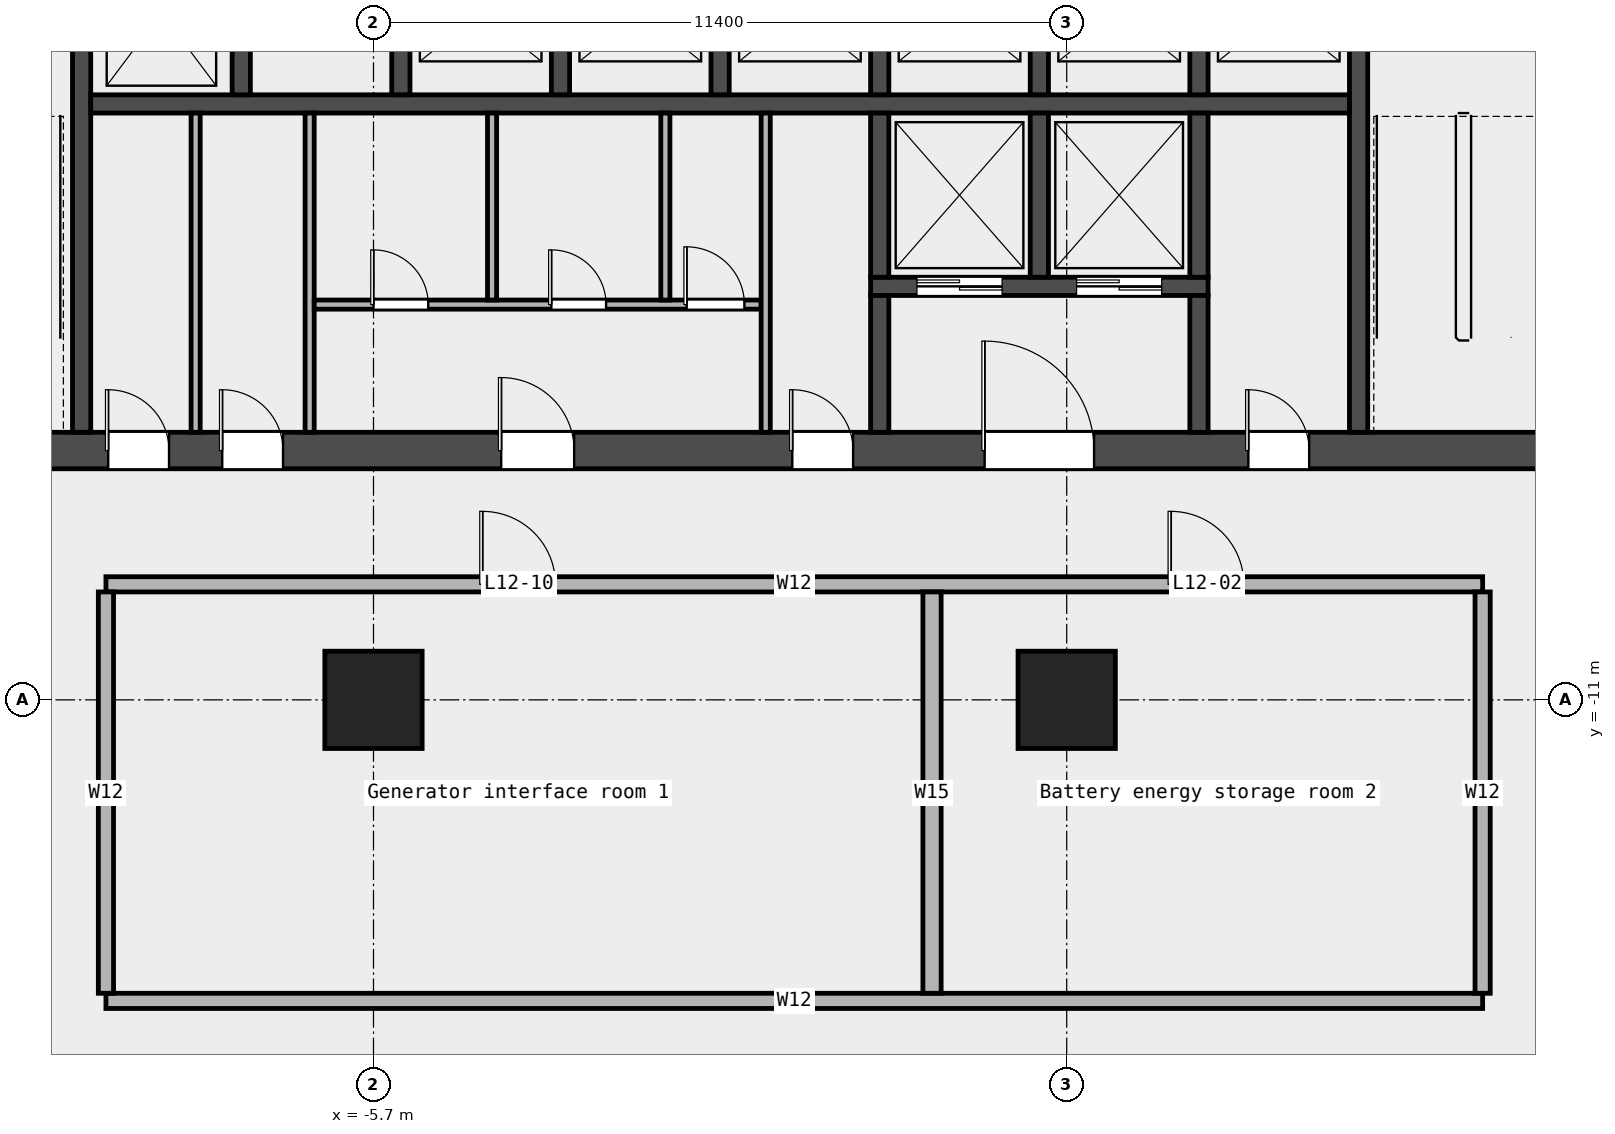
"""IFC4 building model, lengths in metres.
Left out: names, types, materials, properties, quantities, classifications, styles, units other than length and angle.
Written with IfcOpenShell. Run it as: python <this file> out.ifc"""

import sys

from ifc_helpers import new_model, si_unit, direction, frame, frame_2d, origin, origin_2d, place, context, subcontext, project, spatial, rectangle, extrude, element, fill, save


model = new_model("IFC4")
c1 = context("Model", 3, precision=1e-05, world=origin(), true_north=direction((0.0, 1.0)))
c2 = subcontext(c1, "Body", "Model", "MODEL_VIEW")
j1 = project(units=[si_unit("LENGTHUNIT", "METRE"), si_unit("PLANEANGLEUNIT", "RADIAN")], contexts=[c1])
p1 = place(None, origin())
s1 = spatial("IfcSite", under=j1, at=p1, CompositionType="ELEMENT")
p2 = place(p1, origin())
s2 = spatial("IfcBuilding", under=s1, at=p2, CompositionType="ELEMENT")
p3 = place(p2, frame((0.0, 0.0, 64.6)))
s3 = spatial("IfcBuildingStorey", under=s2, at=p3, CompositionType="ELEMENT", Elevation=64.6)
for number, where, z_axis, x_axis in (
    (1, (-5.7, -11.0, 0.0), (0.0, 0.0, 1.0), (1.0, 0.0, 0.0)),
    (2, (5.7, -11.0, 0.0), (0.0, 0.0, 1.0), (1.0, 0.0, 0.0)),
):
    element("IfcColumn", number, at=place(p3, frame(where, z_axis=z_axis, x_axis=x_axis)), inside=s3, PredefinedType="COLUMN", context=c2, shape_type="SweptSolid", body=[
        extrude(rectangle(XDim=1.6, YDim=1.6, at=origin_2d()), origin(), (0.0, 0.0, 1.0), 4.35),
    ])
p4 = place(p3, frame((-10.1, -15.95, 0.0), z_axis=(0.0, 0.0, 1.0), x_axis=(1.0, 0.0, 0.0)))
e3 = element("IfcWall", 3, at=p4, inside=s3, PredefinedType="PARTITIONING", context=c2, shape_type="SweptSolid", body=[
    extrude(rectangle(XDim=22.64, YDim=0.25, at=frame_2d((11.32, 0.0))), origin(), (0.0, 0.0, 1.0), 4.35),
])
p5 = place(p3, frame((-10.1, -9.1, 0.0), z_axis=(0.0, 0.0, 1.0), x_axis=(1.0, 0.0, 0.0)))
e4 = element("IfcWall", 4, at=p5, inside=s3, PredefinedType="PARTITIONING", context=c2, shape_type="SweptSolid", body=[
    extrude(rectangle(XDim=22.64, YDim=0.25, at=frame_2d((11.32, 0.0))), origin(), (0.0, 0.0, 1.0), 4.35),
])
p6 = place(p5, frame((17.512, 0.0, 0.0)))
e5 = element("IfcOpeningElement", 5, at=p6, cuts=e4, PredefinedType="OPENING", context=c2, shape_type="SweptSolid", body=[
    extrude(rectangle(XDim=1.2, YDim=2.1, at=frame_2d((0.6, 1.05))), frame((0.0, 0.137, 0.0), z_axis=(0.0, -1.0, 0.0), x_axis=(1.0, 0.0, 0.0)), (0.0, 0.0, 1.0), 0.274),
])
p7 = place(p5, frame((6.192, 0.0, 0.0)))
e6 = element("IfcOpeningElement", 6, at=p7, cuts=e4, PredefinedType="OPENING", context=c2, shape_type="SweptSolid", body=[
    extrude(rectangle(XDim=1.2, YDim=2.1, at=frame_2d((0.6, 1.05))), frame((0.0, 0.137, 0.0), z_axis=(0.0, -1.0, 0.0), x_axis=(1.0, 0.0, 0.0)), (0.0, 0.0, 1.0), 0.274),
])
p8 = place(p3, frame((-10.1, -15.825, 0.0), z_axis=(0.0, 0.0, 1.0), x_axis=(0.0, 1.0, 0.0)))
e7 = element("IfcWall", 7, at=p8, inside=s3, PredefinedType="PARTITIONING", context=c2, shape_type="SweptSolid", body=[
    extrude(rectangle(XDim=6.6, YDim=0.25, at=frame_2d((3.3, 0.0))), origin(), (0.0, 0.0, 1.0), 4.35),
])
p9 = place(p3, frame((3.485, -15.825, 0.0), z_axis=(0.0, 0.0, 1.0), x_axis=(0.0, 1.0, 0.0)))
e8 = element("IfcWall", 8, at=p9, inside=s3, PredefinedType="PARTITIONING", context=c2, shape_type="SweptSolid", body=[
    extrude(rectangle(XDim=6.6, YDim=0.3, at=frame_2d((3.3, 0.0))), origin(), (0.0, 0.0, 1.0), 4.35),
])
p10 = place(p3, frame((12.54, -15.825, 0.0), z_axis=(0.0, 0.0, 1.0), x_axis=(0.0, 1.0, 0.0)))
e9 = element("IfcWall", 9, at=p10, inside=s3, PredefinedType="PARTITIONING", context=c2, shape_type="SweptSolid", body=[
    extrude(rectangle(XDim=6.6, YDim=0.25, at=frame_2d((3.3, 0.0))), origin(), (0.0, 0.0, 1.0), 4.35),
])
p11 = place(p3, frame((-14.4, -6.9, 0.0), z_axis=(0.0, 0.0, 1.0), x_axis=(1.0, 0.0, 0.0)))
e10 = element("IfcWall", 10, at=p11, inside=s3, PredefinedType="SHEAR", context=c2, shape_type="SweptSolid", body=[
    extrude(rectangle(XDim=28.8, YDim=0.6, at=frame_2d((14.4, 0.0))), origin(), (0.0, 0.0, 1.0), 4.5),
])
p12 = place(p11, frame((4.337, 0.0, 0.0)))
e11 = element("IfcOpeningElement", 11, at=p12, cuts=e10, PredefinedType="OPENING", context=c2, shape_type="SweptSolid", body=[
    extrude(rectangle(XDim=1.0, YDim=2.1, at=frame_2d((0.5, 1.05))), frame((0.0, 0.312, 0.0), z_axis=(0.0, -1.0, 0.0), x_axis=(1.0, 0.0, 0.0)), (0.0, 0.0, 1.0), 0.624),
])
p13 = place(p11, frame((6.212, 0.0, 0.0)))
e12 = element("IfcOpeningElement", 12, at=p13, cuts=e10, PredefinedType="OPENING", context=c2, shape_type="SweptSolid", body=[
    extrude(rectangle(XDim=1.0, YDim=2.1, at=frame_2d((0.5, 1.05))), frame((0.0, 0.312, 0.0), z_axis=(0.0, -1.0, 0.0), x_axis=(1.0, 0.0, 0.0)), (0.0, 0.0, 1.0), 0.624),
])
p14 = place(p11, frame((10.8, 0.0, 0.0)))
e13 = element("IfcOpeningElement", 13, at=p14, cuts=e10, PredefinedType="OPENING", context=c2, shape_type="SweptSolid", body=[
    extrude(rectangle(XDim=1.2, YDim=2.1, at=frame_2d((0.6, 1.05))), frame((0.0, 0.312, 0.0), z_axis=(0.0, -1.0, 0.0), x_axis=(1.0, 0.0, 0.0)), (0.0, 0.0, 1.0), 0.624),
])
p15 = place(p11, frame((15.587, 0.0, 0.0)))
e14 = element("IfcOpeningElement", 14, at=p15, cuts=e10, PredefinedType="OPENING", context=c2, shape_type="SweptSolid", body=[
    extrude(rectangle(XDim=1.0, YDim=2.1, at=frame_2d((0.5, 1.05))), frame((0.0, 0.312, 0.0), z_axis=(0.0, -1.0, 0.0), x_axis=(1.0, 0.0, 0.0)), (0.0, 0.0, 1.0), 0.624),
])
p16 = place(p11, frame((18.75, 0.0, 0.0)))
e15 = element("IfcOpeningElement", 15, at=p16, cuts=e10, PredefinedType="OPENING", context=c2, shape_type="SweptSolid", body=[
    extrude(rectangle(XDim=1.8, YDim=2.1, at=frame_2d((0.9, 1.05))), frame((0.0, 0.312, 0.0), z_axis=(0.0, -1.0, 0.0), x_axis=(1.0, 0.0, 0.0)), (0.0, 0.0, 1.0), 0.624),
])
p17 = place(p11, frame((23.087, 0.0, 0.0)))
e16 = element("IfcOpeningElement", 16, at=p17, cuts=e10, PredefinedType="OPENING", context=c2, shape_type="SweptSolid", body=[
    extrude(rectangle(XDim=1.0, YDim=2.1, at=frame_2d((0.5, 1.05))), frame((0.0, 0.312, 0.0), z_axis=(0.0, -1.0, 0.0), x_axis=(1.0, 0.0, 0.0)), (0.0, 0.0, 1.0), 0.624),
])
for number, where, z_axis, x_axis in (
    (17, (-10.5, -6.6, 0.0), (0.0, 0.0, 1.0), (0.0, 1.0, 0.0)),
    (18, (10.5, -6.6, 0.0), (0.0, 0.0, 1.0), (0.0, 1.0, 0.0)),
):
    element("IfcWall", number, at=place(p3, frame(where, z_axis=z_axis, x_axis=x_axis)), inside=s3, PredefinedType="SHEAR", context=c2, shape_type="SweptSolid", body=[
        extrude(rectangle(XDim=8.55, YDim=0.3, at=frame_2d((4.275, 0.0))), origin(), (0.0, 0.0, 1.0), 4.5),
    ])
p18 = place(p3, frame((-10.35, -1.2, 0.0), z_axis=(0.0, 0.0, 1.0), x_axis=(1.0, 0.0, 0.0)))
e19 = element("IfcWall", 19, at=p18, inside=s3, PredefinedType="SOLIDWALL", context=c2, shape_type="SweptSolid", body=[
    extrude(rectangle(XDim=20.7, YDim=0.3, at=frame_2d((10.35, 0.0))), origin(), (0.0, 0.0, 1.0), 4.5),
])
for number, where, z_axis, x_axis in (
    (20, (-7.875, -1.05, 0.0), (0.0, 0.0, 1.0), (0.0, 1.0, 0.0)),
    (21, (-5.25, -1.05, 0.0), (0.0, 0.0, 1.0), (0.0, 1.0, 0.0)),
    (22, (-2.625, -1.05, 0.0), (0.0, 0.0, 1.0), (0.0, 1.0, 0.0)),
    (23, (0.0, -1.05, 0.0), (0.0, 0.0, 1.0), (0.0, 1.0, 0.0)),
    (24, (2.625, -1.05, 0.0), (0.0, 0.0, 1.0), (0.0, 1.0, 0.0)),
    (25, (5.25, -1.05, 0.0), (0.0, 0.0, 1.0), (0.0, 1.0, 0.0)),
    (26, (7.875, -1.05, 0.0), (0.0, 0.0, 1.0), (0.0, 1.0, 0.0)),
):
    element("IfcWall", number, at=place(p3, frame(where, z_axis=z_axis, x_axis=x_axis)), inside=s3, PredefinedType="SOLIDWALL", context=c2, shape_type="SweptSolid", body=[
        extrude(rectangle(XDim=2.7, YDim=0.3, at=frame_2d((1.35, 0.0))), origin(), (0.0, 0.0, 1.0), 4.5),
    ])
p19 = place(p3, frame((2.475, -4.2, 0.0), z_axis=(0.0, 0.0, 1.0), x_axis=(1.0, 0.0, 0.0)))
e27 = element("IfcWall", 27, at=p19, inside=s3, PredefinedType="SOLIDWALL", context=c2, shape_type="SweptSolid", body=[
    extrude(rectangle(XDim=5.55, YDim=0.3, at=frame_2d((2.775, 0.0))), origin(), (0.0, 0.0, 1.0), 4.5),
])
p20 = place(p19, frame((0.762, 0.0, 0.0)))
e28 = element("IfcOpeningElement", 28, at=p20, cuts=e27, PredefinedType="OPENING", context=c2, shape_type="SweptSolid", body=[
    extrude(rectangle(XDim=1.4, YDim=2.1, at=frame_2d((0.7, 1.05))), frame((0.0, 0.162, 0.0), z_axis=(0.0, -1.0, 0.0), x_axis=(1.0, 0.0, 0.0)), (0.0, 0.0, 1.0), 0.324),
])
p21 = place(p19, frame((3.387, 0.0, 0.0)))
e29 = element("IfcOpeningElement", 29, at=p21, cuts=e27, PredefinedType="OPENING", context=c2, shape_type="SweptSolid", body=[
    extrude(rectangle(XDim=1.4, YDim=2.1, at=frame_2d((0.7, 1.05))), frame((0.0, 0.162, 0.0), z_axis=(0.0, -1.0, 0.0), x_axis=(1.0, 0.0, 0.0)), (0.0, 0.0, 1.0), 0.324),
])
p22 = place(p3, frame((2.625, -4.05, 0.0), z_axis=(0.0, 0.0, 1.0), x_axis=(0.0, 1.0, 0.0)))
e30 = element("IfcWall", 30, at=p22, inside=s3, PredefinedType="SOLIDWALL", context=c2, shape_type="SweptSolid", body=[
    extrude(rectangle(XDim=2.7, YDim=0.3, at=frame_2d((1.35, 0.0))), origin(), (0.0, 0.0, 1.0), 4.5),
])
p23 = place(p3, frame((2.625, -6.6, 0.0), z_axis=(0.0, 0.0, 1.0), x_axis=(0.0, 1.0, 0.0)))
e31 = element("IfcWall", 31, at=p23, inside=s3, PredefinedType="SOLIDWALL", context=c2, shape_type="SweptSolid", body=[
    extrude(rectangle(XDim=2.25, YDim=0.3, at=frame_2d((1.125, 0.0))), origin(), (0.0, 0.0, 1.0), 4.5),
])
for number, where, z_axis, x_axis in (
    (32, (5.25, -4.05, 0.0), (0.0, 0.0, 1.0), (0.0, 1.0, 0.0)),
    (33, (7.875, -4.05, 0.0), (0.0, 0.0, 1.0), (0.0, 1.0, 0.0)),
):
    element("IfcWall", number, at=place(p3, frame(where, z_axis=z_axis, x_axis=x_axis)), inside=s3, PredefinedType="SOLIDWALL", context=c2, shape_type="SweptSolid", body=[
        extrude(rectangle(XDim=2.7, YDim=0.3, at=frame_2d((1.35, 0.0))), origin(), (0.0, 0.0, 1.0), 4.5),
    ])
p24 = place(p3, frame((7.875, -6.6, 0.0), z_axis=(0.0, 0.0, 1.0), x_axis=(0.0, 1.0, 0.0)))
e34 = element("IfcWall", 34, at=p24, inside=s3, PredefinedType="SOLIDWALL", context=c2, shape_type="SweptSolid", body=[
    extrude(rectangle(XDim=2.25, YDim=0.3, at=frame_2d((1.125, 0.0))), origin(), (0.0, 0.0, 1.0), 4.5),
])
for number, where, z_axis, x_axis in (
    (35, (-8.625, -6.6, 0.0), (0.0, 0.0, 1.0), (0.0, 1.0, 0.0)),
    (36, (-6.75, -6.6, 0.0), (0.0, 0.0, 1.0), (0.0, 1.0, 0.0)),
):
    element("IfcWall", number, at=place(p3, frame(where, z_axis=z_axis, x_axis=x_axis)), inside=s3, PredefinedType="PARTITIONING", context=c2, shape_type="SweptSolid", body=[
        extrude(rectangle(XDim=5.25, YDim=0.15, at=frame_2d((2.625, 0.0))), origin(), (0.0, 0.0, 1.0), 4.5),
    ])
p25 = place(p3, frame((-6.675, -4.5, 0.0), z_axis=(0.0, 0.0, 1.0), x_axis=(1.0, 0.0, 0.0)))
e37 = element("IfcWall", 37, at=p25, inside=s3, PredefinedType="PARTITIONING", context=c2, shape_type="SweptSolid", body=[
    extrude(rectangle(XDim=7.35, YDim=0.15, at=frame_2d((3.675, 0.0))), origin(), (0.0, 0.0, 1.0), 4.5),
])
p26 = place(p25, frame((0.975, 0.0, 0.0)))
e38 = element("IfcOpeningElement", 38, at=p26, cuts=e37, PredefinedType="OPENING", context=c2, shape_type="SweptSolid", body=[
    extrude(rectangle(XDim=0.9, YDim=2.1, at=frame_2d((0.45, 1.05))), frame((0.0, 0.087, 0.0), z_axis=(0.0, -1.0, 0.0), x_axis=(1.0, 0.0, 0.0)), (0.0, 0.0, 1.0), 0.174),
])
p27 = place(p25, frame((3.9, 0.0, 0.0)))
e39 = element("IfcOpeningElement", 39, at=p27, cuts=e37, PredefinedType="OPENING", context=c2, shape_type="SweptSolid", body=[
    extrude(rectangle(XDim=0.9, YDim=2.1, at=frame_2d((0.45, 1.05))), frame((0.0, 0.087, 0.0), z_axis=(0.0, -1.0, 0.0), x_axis=(1.0, 0.0, 0.0)), (0.0, 0.0, 1.0), 0.174),
])
p28 = place(p25, frame((6.125, 0.0, 0.0)))
e40 = element("IfcOpeningElement", 40, at=p28, cuts=e37, PredefinedType="OPENING", context=c2, shape_type="SweptSolid", body=[
    extrude(rectangle(XDim=0.95, YDim=2.1, at=frame_2d((0.475, 1.05))), frame((0.0, 0.087, 0.0), z_axis=(0.0, -1.0, 0.0), x_axis=(1.0, 0.0, 0.0)), (0.0, 0.0, 1.0), 0.174),
])
for number, where, z_axis, x_axis in (
    (41, (-3.75, -4.425, 0.0), (0.0, 0.0, 1.0), (0.0, 1.0, 0.0)),
    (42, (-0.9, -4.425, 0.0), (0.0, 0.0, 1.0), (0.0, 1.0, 0.0)),
):
    element("IfcWall", number, at=place(p3, frame(where, z_axis=z_axis, x_axis=x_axis)), inside=s3, PredefinedType="PARTITIONING", context=c2, shape_type="SweptSolid", body=[
        extrude(rectangle(XDim=3.075, YDim=0.15, at=frame_2d((1.538, 0.0))), origin(), (0.0, 0.0, 1.0), 4.5),
    ])
p29 = place(p3, frame((0.75, -6.6, 0.0), z_axis=(0.0, 0.0, 1.0), x_axis=(0.0, 1.0, 0.0)))
e43 = element("IfcWall", 43, at=p29, inside=s3, PredefinedType="PARTITIONING", context=c2, shape_type="SweptSolid", body=[
    extrude(rectangle(XDim=5.25, YDim=0.15, at=frame_2d((2.625, 0.0))), origin(), (0.0, 0.0, 1.0), 4.5),
])
p30 = place(p6, origin())
e44 = element("IfcDoor", 44, at=p30, inside=s3, OperationType="SINGLE_SWING_LEFT", PredefinedType="DOOR", context=c2, shape_type="SweptSolid", body=[
    extrude(rectangle(XDim=1.2, YDim=2.1, at=frame_2d((0.6, 1.05))), frame((0.0, 0.025, 0.0), z_axis=(0.0, -1.0, 0.0), x_axis=(1.0, 0.0, 0.0)), (0.0, 0.0, 1.0), 0.05),
])
fill(e5, e44)
p31 = place(p7, origin())
e45 = element("IfcDoor", 45, at=p31, inside=s3, OperationType="SINGLE_SWING_LEFT", PredefinedType="DOOR", context=c2, shape_type="SweptSolid", body=[
    extrude(rectangle(XDim=1.2, YDim=2.1, at=frame_2d((0.6, 1.05))), frame((0.0, 0.025, 0.0), z_axis=(0.0, -1.0, 0.0), x_axis=(1.0, 0.0, 0.0)), (0.0, 0.0, 1.0), 0.05),
])
fill(e6, e45)
p32 = place(p20, origin())
e46 = element("IfcDoor", 46, at=p32, inside=s3, OperationType="DOUBLE_DOOR_SLIDING", PredefinedType="DOOR", context=c2, shape_type="SweptSolid", body=[
    extrude(rectangle(XDim=1.4, YDim=2.1, at=frame_2d((0.7, 1.05))), frame((0.0, 0.025, 0.0), z_axis=(0.0, -1.0, 0.0), x_axis=(1.0, 0.0, 0.0)), (0.0, 0.0, 1.0), 0.05),
])
fill(e28, e46)
p33 = place(p21, origin())
e47 = element("IfcDoor", 47, at=p33, inside=s3, OperationType="DOUBLE_DOOR_SLIDING", PredefinedType="DOOR", context=c2, shape_type="SweptSolid", body=[
    extrude(rectangle(XDim=1.4, YDim=2.1, at=frame_2d((0.7, 1.05))), frame((0.0, 0.025, 0.0), z_axis=(0.0, -1.0, 0.0), x_axis=(1.0, 0.0, 0.0)), (0.0, 0.0, 1.0), 0.05),
])
fill(e29, e47)
p34 = place(p12, origin())
e48 = element("IfcDoor", 48, at=p34, inside=s3, OperationType="SINGLE_SWING_LEFT", PredefinedType="DOOR", context=c2, shape_type="SweptSolid", body=[
    extrude(rectangle(XDim=1.0, YDim=2.1, at=frame_2d((0.5, 1.05))), frame((0.0, 0.025, 0.0), z_axis=(0.0, -1.0, 0.0), x_axis=(1.0, 0.0, 0.0)), (0.0, 0.0, 1.0), 0.05),
])
fill(e11, e48)
p35 = place(p13, origin())
e49 = element("IfcDoor", 49, at=p35, inside=s3, OperationType="SINGLE_SWING_LEFT", PredefinedType="DOOR", context=c2, shape_type="SweptSolid", body=[
    extrude(rectangle(XDim=1.0, YDim=2.1, at=frame_2d((0.5, 1.05))), frame((0.0, 0.025, 0.0), z_axis=(0.0, -1.0, 0.0), x_axis=(1.0, 0.0, 0.0)), (0.0, 0.0, 1.0), 0.05),
])
fill(e12, e49)
p36 = place(p14, origin())
e50 = element("IfcDoor", 50, at=p36, inside=s3, OperationType="SINGLE_SWING_LEFT", PredefinedType="DOOR", context=c2, shape_type="SweptSolid", body=[
    extrude(rectangle(XDim=1.2, YDim=2.1, at=frame_2d((0.6, 1.05))), frame((0.0, 0.025, 0.0), z_axis=(0.0, -1.0, 0.0), x_axis=(1.0, 0.0, 0.0)), (0.0, 0.0, 1.0), 0.05),
])
fill(e13, e50)
p37 = place(p26, origin())
e51 = element("IfcDoor", 51, at=p37, inside=s3, OperationType="SINGLE_SWING_LEFT", PredefinedType="DOOR", context=c2, shape_type="SweptSolid", body=[
    extrude(rectangle(XDim=0.9, YDim=2.1, at=frame_2d((0.45, 1.05))), frame((0.0, 0.025, 0.0), z_axis=(0.0, -1.0, 0.0), x_axis=(1.0, 0.0, 0.0)), (0.0, 0.0, 1.0), 0.05),
])
fill(e38, e51)
p38 = place(p27, origin())
e52 = element("IfcDoor", 52, at=p38, inside=s3, OperationType="SINGLE_SWING_LEFT", PredefinedType="DOOR", context=c2, shape_type="SweptSolid", body=[
    extrude(rectangle(XDim=0.9, YDim=2.1, at=frame_2d((0.45, 1.05))), frame((0.0, 0.025, 0.0), z_axis=(0.0, -1.0, 0.0), x_axis=(1.0, 0.0, 0.0)), (0.0, 0.0, 1.0), 0.05),
])
fill(e39, e52)
p39 = place(p28, origin())
e53 = element("IfcDoor", 53, at=p39, inside=s3, OperationType="SINGLE_SWING_LEFT", PredefinedType="DOOR", context=c2, shape_type="SweptSolid", body=[
    extrude(rectangle(XDim=0.95, YDim=2.1, at=frame_2d((0.475, 1.05))), frame((0.0, 0.025, 0.0), z_axis=(0.0, -1.0, 0.0), x_axis=(1.0, 0.0, 0.0)), (0.0, 0.0, 1.0), 0.05),
])
fill(e40, e53)
p40 = place(p15, origin())
e54 = element("IfcDoor", 54, at=p40, inside=s3, OperationType="SINGLE_SWING_LEFT", PredefinedType="DOOR", context=c2, shape_type="SweptSolid", body=[
    extrude(rectangle(XDim=1.0, YDim=2.1, at=frame_2d((0.5, 1.05))), frame((0.0, 0.025, 0.0), z_axis=(0.0, -1.0, 0.0), x_axis=(1.0, 0.0, 0.0)), (0.0, 0.0, 1.0), 0.05),
])
fill(e14, e54)
p41 = place(p16, origin())
e55 = element("IfcDoor", 55, at=p41, inside=s3, OperationType="DOUBLE_DOOR_SINGLE_SWING", PredefinedType="DOOR", context=c2, shape_type="SweptSolid", body=[
    extrude(rectangle(XDim=1.8, YDim=2.1, at=frame_2d((0.9, 1.05))), frame((0.0, 0.025, 0.0), z_axis=(0.0, -1.0, 0.0), x_axis=(1.0, 0.0, 0.0)), (0.0, 0.0, 1.0), 0.05),
])
fill(e15, e55)
p42 = place(p17, origin())
e56 = element("IfcDoor", 56, at=p42, inside=s3, OperationType="SINGLE_SWING_LEFT", PredefinedType="DOOR", context=c2, shape_type="SweptSolid", body=[
    extrude(rectangle(XDim=1.0, YDim=2.1, at=frame_2d((0.5, 1.05))), frame((0.0, 0.025, 0.0), z_axis=(0.0, -1.0, 0.0), x_axis=(1.0, 0.0, 0.0)), (0.0, 0.0, 1.0), 0.05),
])
fill(e16, e56)
save(model, sys.argv[1])
